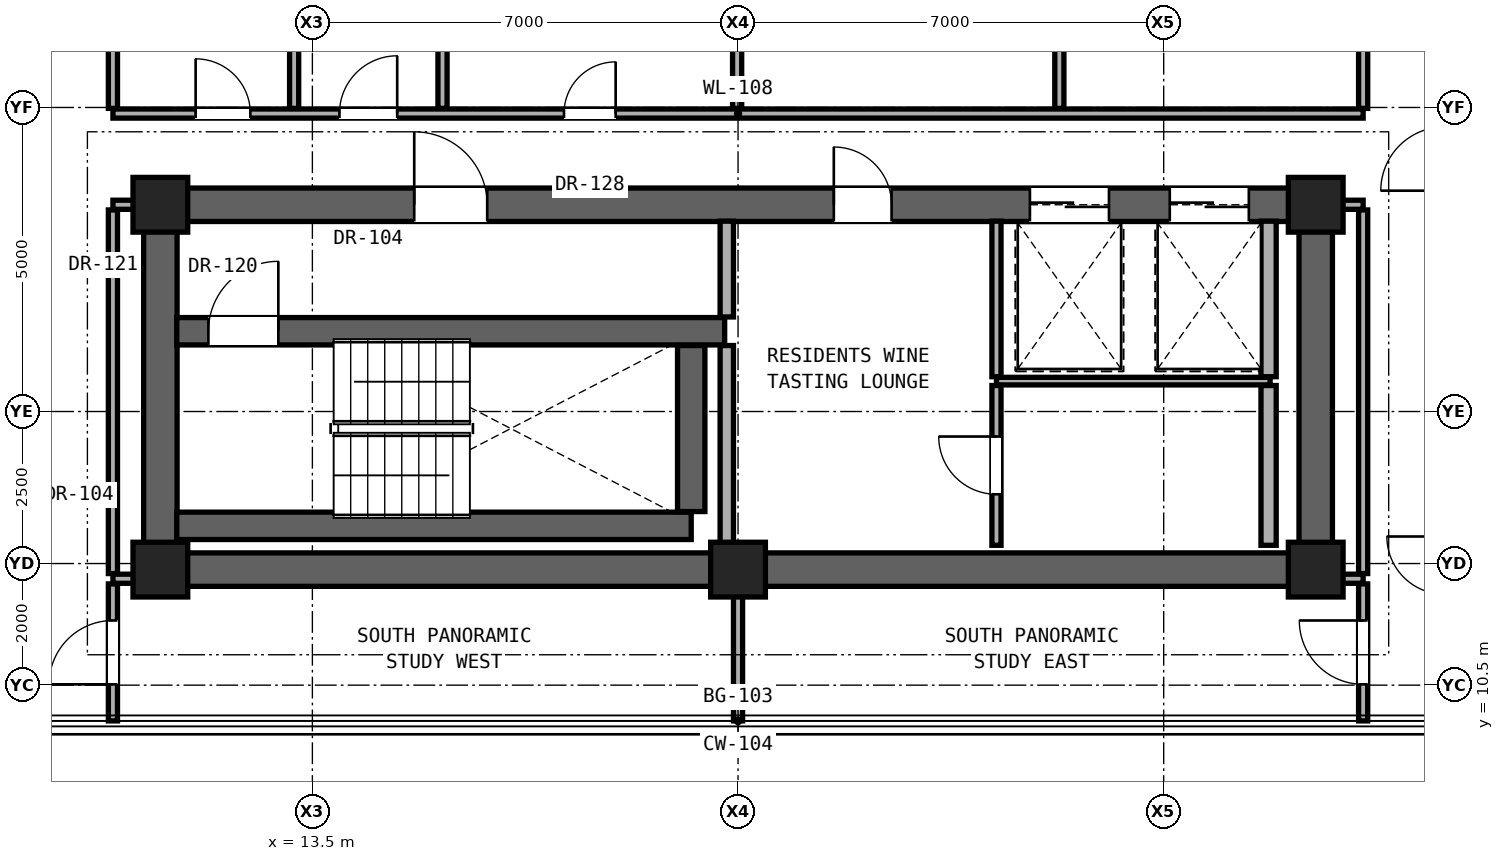
"""IFC4 building model, lengths in metres.
Left out: names, types, materials, properties, quantities, classifications, styles, units other than length and angle.
Written with IfcOpenShell. Run it as: python <this file> out.ifc"""

import sys

from ifc_helpers import new_model, si_unit, direction, frame, frame_2d, origin, origin_2d, place, context, subcontext, project, spatial, rectangle, extrude, element, fill, save


model = new_model("IFC4")
c1 = context("Model", 3, precision=1e-05, world=origin(), true_north=direction((0.0, 1.0)))
c2 = subcontext(c1, "Body", "Model", "MODEL_VIEW")
j1 = project(units=[si_unit("LENGTHUNIT", "METRE"), si_unit("PLANEANGLEUNIT", "RADIAN")], contexts=[c1])
p1 = place(None, origin())
s1 = spatial("IfcSite", under=j1, at=p1, CompositionType="ELEMENT")
p2 = place(p1, origin())
s2 = spatial("IfcBuilding", under=s1, at=p2, CompositionType="ELEMENT")
p3 = place(p2, frame((0.0, 0.0, 186.9)))
s3 = spatial("IfcBuildingStorey", under=s2, at=p3, CompositionType="ELEMENT", Elevation=186.9)
for number, where, z_axis, x_axis in (
    (1, (11.0, 12.4, 0.0), (0.0, 0.0, 1.0), (1.0, 0.0, 0.0)),
    (2, (20.5, 12.4, 0.0), (0.0, 0.0, 1.0), (1.0, 0.0, 0.0)),
    (3, (30.0, 12.4, 0.0), (0.0, 0.0, 1.0), (1.0, 0.0, 0.0)),
    (4, (11.0, 18.4, 0.0), (0.0, 0.0, 1.0), (1.0, 0.0, 0.0)),
    (5, (30.0, 18.4, 0.0), (0.0, 0.0, 1.0), (1.0, 0.0, 0.0)),
):
    element("IfcColumn", number, at=place(p3, frame(where, z_axis=z_axis, x_axis=x_axis)), inside=s3, PredefinedType="COLUMN", context=c2, shape_type="SweptSolid", body=[
        extrude(rectangle(XDim=0.9, YDim=0.9, at=origin_2d()), origin(), (0.0, 0.0, 1.0), 3.25),
    ])
p4 = place(p3, frame((11.0, 12.4, 0.0), z_axis=(0.0, 0.0, 1.0), x_axis=(1.0, 0.0, 0.0)))
e6 = element("IfcWall", 6, at=p4, inside=s3, PredefinedType="SHEAR", context=c2, shape_type="SweptSolid", body=[
    extrude(rectangle(XDim=19.0, YDim=0.55, at=frame_2d((9.5, 0.0))), origin(), (0.0, 0.0, 1.0), 3.05),
])
for number, where, z_axis, x_axis in (
    (7, (11.0, 12.4, 0.0), (0.0, 0.0, 1.0), (0.0, 1.0, 0.0)),
    (8, (30.0, 12.4, 0.0), (0.0, 0.0, 1.0), (0.0, 1.0, 0.0)),
):
    element("IfcWall", number, at=place(p3, frame(where, z_axis=z_axis, x_axis=x_axis)), inside=s3, PredefinedType="SHEAR", context=c2, shape_type="SweptSolid", body=[
        extrude(rectangle(XDim=6.0, YDim=0.55, at=frame_2d((3.0, 0.0))), origin(), (0.0, 0.0, 1.0), 3.05),
    ])
p5 = place(p3, frame((11.0, 18.4, 0.0), z_axis=(0.0, 0.0, 1.0), x_axis=(1.0, 0.0, 0.0)))
e9 = element("IfcWall", 9, at=p5, inside=s3, PredefinedType="SHEAR", context=c2, shape_type="SweptSolid", body=[
    extrude(rectangle(XDim=19.0, YDim=0.55, at=frame_2d((9.5, 0.0))), origin(), (0.0, 0.0, 1.0), 3.05),
])
p6 = place(p5, frame((4.175, 0.0, 0.0)))
e10 = element("IfcOpeningElement", 10, at=p6, cuts=e9, PredefinedType="OPENING", context=c2, shape_type="SweptSolid", body=[
    extrude(rectangle(XDim=1.2, YDim=2.25, at=frame_2d((0.6, 1.125))), frame((0.0, 0.285, 0.0), z_axis=(0.0, -1.0, 0.0), x_axis=(1.0, 0.0, 0.0)), (0.0, 0.0, 1.0), 0.57),
])
p7 = place(p5, frame((11.075, 0.0, 0.0)))
e11 = element("IfcOpeningElement", 11, at=p7, cuts=e9, PredefinedType="OPENING", context=c2, shape_type="SweptSolid", body=[
    extrude(rectangle(XDim=0.95, YDim=2.15, at=frame_2d((0.475, 1.075))), frame((0.0, 0.285, 0.0), z_axis=(0.0, -1.0, 0.0), x_axis=(1.0, 0.0, 0.0)), (0.0, 0.0, 1.0), 0.57),
])
p8 = place(p5, frame((14.3, 0.0, 0.0)))
e12 = element("IfcOpeningElement", 12, at=p8, cuts=e9, PredefinedType="OPENING", context=c2, shape_type="SweptSolid", body=[
    extrude(rectangle(XDim=1.3, YDim=2.3, at=frame_2d((0.65, 1.15))), frame((0.0, 0.285, 0.0), z_axis=(0.0, -1.0, 0.0), x_axis=(1.0, 0.0, 0.0)), (0.0, 0.0, 1.0), 0.57),
])
p9 = place(p5, frame((16.6, 0.0, 0.0)))
e13 = element("IfcOpeningElement", 13, at=p9, cuts=e9, PredefinedType="OPENING", context=c2, shape_type="SweptSolid", body=[
    extrude(rectangle(XDim=1.3, YDim=2.3, at=frame_2d((0.65, 1.15))), frame((0.0, 0.285, 0.0), z_axis=(0.0, -1.0, 0.0), x_axis=(1.0, 0.0, 0.0)), (0.0, 0.0, 1.0), 0.57),
])
for number, where, z_axis, x_axis in (
    (14, (10.22, 12.25, 0.0), (0.0, 0.0, 1.0), (1.0, 0.0, 0.0)),
    (15, (30.27, 12.25, 0.0), (0.0, 0.0, 1.0), (1.0, 0.0, 0.0)),
):
    element("IfcWall", number, at=place(p3, frame(where, z_axis=z_axis, x_axis=x_axis)), inside=s3, PredefinedType="PARTITIONING", context=c2, shape_type="SweptSolid", body=[
        extrude(rectangle(XDim=0.51, YDim=0.15, at=frame_2d((0.255, 0.0))), origin(), (0.0, 0.0, 1.0), 3.05),
    ])
p10 = place(p3, frame((11.27, 13.12, 0.0), z_axis=(0.0, 0.0, 1.0), x_axis=(1.0, 0.0, 0.0)))
e16 = element("IfcWall", 16, at=p10, inside=s3, PredefinedType="SHEAR", context=c2, shape_type="SweptSolid", body=[
    extrude(rectangle(XDim=8.46, YDim=0.45, at=frame_2d((4.23, 0.0))), origin(), (0.0, 0.0, 1.0), 3.05),
])
p11 = place(p3, frame((24.75, 15.5, 0.0), z_axis=(0.0, 0.0, 1.0), x_axis=(1.0, 0.0, 0.0)))
e17 = element("IfcWall", 17, at=p11, inside=s3, PredefinedType="PARTITIONING", context=c2, shape_type="SweptSolid", body=[
    extrude(rectangle(XDim=4.5, YDim=0.125, at=frame_2d((2.25, 0.0))), origin(), (0.0, 0.0, 1.0), 3.05),
])
p12 = place(p3, frame((11.27, 16.32, 0.0), z_axis=(0.0, 0.0, 1.0), x_axis=(1.0, 0.0, 0.0)))
e18 = element("IfcWall", 18, at=p12, inside=s3, PredefinedType="SHEAR", context=c2, shape_type="SweptSolid", body=[
    extrude(rectangle(XDim=9.01, YDim=0.45, at=frame_2d((4.505, 0.0))), origin(), (0.0, 0.0, 1.0), 3.05),
])
p13 = place(p12, frame((0.52, 0.0, 0.0)))
e19 = element("IfcOpeningElement", 19, at=p13, cuts=e18, PredefinedType="OPENING", context=c2, shape_type="SweptSolid", body=[
    extrude(rectangle(XDim=1.15, YDim=2.2, at=frame_2d((0.575, 1.1))), frame((0.0, 0.235, 0.0), z_axis=(0.0, -1.0, 0.0), x_axis=(1.0, 0.0, 0.0)), (0.0, 0.0, 1.0), 0.47),
])
for number, where, z_axis, x_axis in (
    (20, (10.22, 18.4, 0.0), (0.0, 0.0, 1.0), (1.0, 0.0, 0.0)),
    (21, (30.27, 18.4, 0.0), (0.0, 0.0, 1.0), (1.0, 0.0, 0.0)),
):
    element("IfcWall", number, at=place(p3, frame(where, z_axis=z_axis, x_axis=x_axis)), inside=s3, PredefinedType="PARTITIONING", context=c2, shape_type="SweptSolid", body=[
        extrude(rectangle(XDim=0.51, YDim=0.15, at=frame_2d((0.255, 0.0))), origin(), (0.0, 0.0, 1.0), 2.442),
    ])
p14 = place(p3, frame((10.22, 19.9, 0.0), z_axis=(0.0, 0.0, 1.0), x_axis=(1.0, 0.0, 0.0)))
e22 = element("IfcWall", 22, at=p14, inside=s3, PredefinedType="PARTITIONING", context=c2, shape_type="SweptSolid", body=[
    extrude(rectangle(XDim=20.56, YDim=0.15, at=frame_2d((10.28, 0.0))), origin(), (0.0, 0.0, 1.0), 2.186),
])
p15 = place(p14, frame((1.36, 0.0, 0.0)))
e23 = element("IfcOpeningElement", 23, at=p15, cuts=e22, PredefinedType="OPENING", context=c2, shape_type="SweptSolid", body=[
    extrude(rectangle(XDim=0.9, YDim=2.1, at=frame_2d((0.45, 1.05))), frame((0.0, 0.085, 0.0), z_axis=(0.0, -1.0, 0.0), x_axis=(1.0, 0.0, 0.0)), (0.0, 0.0, 1.0), 0.17),
])
p16 = place(p14, frame((3.725, 0.0, 0.0)))
e24 = element("IfcOpeningElement", 24, at=p16, cuts=e22, PredefinedType="OPENING", context=c2, shape_type="SweptSolid", body=[
    extrude(rectangle(XDim=0.95, YDim=2.15, at=frame_2d((0.475, 1.075))), frame((0.0, 0.085, 0.0), z_axis=(0.0, -1.0, 0.0), x_axis=(1.0, 0.0, 0.0)), (0.0, 0.0, 1.0), 0.17),
])
p17 = place(p14, frame((7.417, 0.0, 0.0)))
e25 = element("IfcOpeningElement", 25, at=p17, cuts=e22, PredefinedType="OPENING", context=c2, shape_type="SweptSolid", body=[
    extrude(rectangle(XDim=0.85, YDim=2.01, at=frame_2d((0.425, 1.005))), frame((0.0, 0.085, 0.0), z_axis=(0.0, -1.0, 0.0), x_axis=(1.0, 0.0, 0.0)), (0.0, 0.0, 1.0), 0.17),
])
p18 = place(p3, frame((10.22, 9.912, 0.0), z_axis=(0.0, 0.0, 1.0), x_axis=(0.0, 1.0, 0.0)))
e26 = element("IfcWall", 26, at=p18, inside=s3, PredefinedType="PARTITIONING", context=c2, shape_type="SweptSolid", body=[
    extrude(rectangle(XDim=2.253, YDim=0.15, at=frame_2d((1.126, 0.0))), origin(), (0.0, 0.0, 1.0), 3.05),
])
p19 = place(p18, frame((0.602, 0.0, 0.0)))
e27 = element("IfcOpeningElement", 27, at=p19, cuts=e26, PredefinedType="OPENING", context=c2, shape_type="SweptSolid", body=[
    extrude(rectangle(XDim=1.05, YDim=2.2, at=frame_2d((0.525, 1.1))), frame((0.0, 0.085, 0.0), z_axis=(0.0, -1.0, 0.0), x_axis=(1.0, 0.0, 0.0)), (0.0, 0.0, 1.0), 0.17),
])
p20 = place(p3, frame((10.22, 12.335, 0.0), z_axis=(0.0, 0.0, 1.0), x_axis=(0.0, 1.0, 0.0)))
e28 = element("IfcWall", 28, at=p20, inside=s3, PredefinedType="PARTITIONING", context=c2, shape_type="SweptSolid", body=[
    extrude(rectangle(XDim=5.98, YDim=0.15, at=frame_2d((2.99, 0.0))), origin(), (0.0, 0.0, 1.0), 2.442),
])
for number, where, z_axis, x_axis in (
    (29, (10.22, 19.985, 0.0), (0.0, 0.0, 1.0), (0.0, 1.0, 0.0)),
    (30, (13.2, 19.985, 0.0), (0.0, 0.0, 1.0), (0.0, 1.0, 0.0)),
):
    element("IfcWall", number, at=place(p3, frame(where, z_axis=z_axis, x_axis=x_axis)), inside=s3, PredefinedType="PARTITIONING", context=c2, shape_type="SweptSolid", body=[
        extrude(rectangle(XDim=2.78, YDim=0.15, at=frame_2d((1.39, 0.0))), origin(), (0.0, 0.0, 1.0), 3.05),
    ])
p21 = place(p3, frame((15.64, 19.985, 0.0), z_axis=(0.0, 0.0, 1.0), x_axis=(0.0, 1.0, 0.0)))
e31 = element("IfcWall", 31, at=p21, inside=s3, PredefinedType="PARTITIONING", context=c2, shape_type="SweptSolid", body=[
    extrude(rectangle(XDim=2.78, YDim=0.15, at=frame_2d((1.39, 0.0))), origin(), (0.0, 0.0, 1.0), 2.625),
])
p22 = place(p3, frame((19.73, 13.355, 0.0), z_axis=(0.0, 0.0, 1.0), x_axis=(0.0, 1.0, 0.0)))
e32 = element("IfcWall", 32, at=p22, inside=s3, PredefinedType="SHEAR", context=c2, shape_type="SweptSolid", body=[
    extrude(rectangle(XDim=2.73, YDim=0.45, at=frame_2d((1.365, 0.0))), origin(), (0.0, 0.0, 1.0), 3.05),
])
p23 = place(p3, frame((20.315, 12.8, 0.0), z_axis=(0.0, 0.0, 1.0), x_axis=(0.0, 1.0, 0.0)))
e33 = element("IfcWall", 33, at=p23, inside=s3, PredefinedType="SOLIDWALL", context=c2, shape_type="SweptSolid", body=[
    extrude(rectangle(XDim=3.285, YDim=0.22, at=frame_2d((1.643, 0.0))), origin(), (0.0, 0.0, 1.0), 3.05),
])
p24 = place(p3, frame((20.315, 16.555, 0.0), z_axis=(0.0, 0.0, 1.0), x_axis=(0.0, 1.0, 0.0)))
e34 = element("IfcWall", 34, at=p24, inside=s3, PredefinedType="SOLIDWALL", context=c2, shape_type="SweptSolid", body=[
    extrude(rectangle(XDim=1.575, YDim=0.22, at=frame_2d((0.788, 0.0))), origin(), (0.0, 0.0, 1.0), 3.05),
])
p25 = place(p3, frame((20.5, 9.912, 0.0), z_axis=(0.0, 0.0, 1.0), x_axis=(0.0, 1.0, 0.0)))
e35 = element("IfcWall", 35, at=p25, inside=s3, PredefinedType="PARTITIONING", context=c2, shape_type="SweptSolid", body=[
    extrude(rectangle(XDim=2.218, YDim=0.15, at=frame_2d((1.109, 0.0))), origin(), (0.0, 0.0, 1.0), 3.05),
])
p26 = place(p3, frame((20.485, 19.985, 0.0), z_axis=(0.0, 0.0, 1.0), x_axis=(0.0, 1.0, 0.0)))
e36 = element("IfcWall", 36, at=p26, inside=s3, PredefinedType="PARTITIONING", context=c2, shape_type="SweptSolid", body=[
    extrude(rectangle(XDim=13.03, YDim=0.15, at=frame_2d((6.515, 0.0))), origin(), (0.0, 0.0, 1.0), 2.186),
])
p27 = place(p3, frame((24.75, 12.8, 0.0), z_axis=(0.0, 0.0, 1.0), x_axis=(0.0, 1.0, 0.0)))
e37 = element("IfcWall", 37, at=p27, inside=s3, PredefinedType="PARTITIONING", context=c2, shape_type="SweptSolid", body=[
    extrude(rectangle(XDim=2.627, YDim=0.15, at=frame_2d((1.314, 0.0))), origin(), (0.0, 0.0, 1.0), 3.05),
])
p28 = place(p27, frame((0.839, 0.0, 0.0)))
e38 = element("IfcOpeningElement", 38, at=p28, cuts=e37, PredefinedType="OPENING", context=c2, shape_type="SweptSolid", body=[
    extrude(rectangle(XDim=0.95, YDim=2.15, at=frame_2d((0.475, 1.075))), frame((0.0, 0.085, 0.0), z_axis=(0.0, -1.0, 0.0), x_axis=(1.0, 0.0, 0.0)), (0.0, 0.0, 1.0), 0.17),
])
p29 = place(p3, frame((24.75, 15.573, 0.0), z_axis=(0.0, 0.0, 1.0), x_axis=(0.0, 1.0, 0.0)))
e39 = element("IfcWall", 39, at=p29, inside=s3, PredefinedType="PARTITIONING", context=c2, shape_type="SweptSolid", body=[
    extrude(rectangle(XDim=2.557, YDim=0.15, at=frame_2d((1.279, 0.0))), origin(), (0.0, 0.0, 1.0), 3.05),
])
p30 = place(p3, frame((25.784, 19.985, 0.0), z_axis=(0.0, 0.0, 1.0), x_axis=(0.0, 1.0, 0.0)))
e40 = element("IfcWall", 40, at=p30, inside=s3, PredefinedType="PARTITIONING", context=c2, shape_type="SweptSolid", body=[
    extrude(rectangle(XDim=13.03, YDim=0.15, at=frame_2d((6.515, 0.0))), origin(), (0.0, 0.0, 1.0), 2.186),
])
p31 = place(p3, frame((29.225, 12.8, 0.0), z_axis=(0.0, 0.0, 1.0), x_axis=(0.0, 1.0, 0.0)))
e41 = element("IfcWall", 41, at=p31, inside=s3, PredefinedType="SOLIDWALL", context=c2, shape_type="SweptSolid", body=[
    extrude(rectangle(XDim=2.627, YDim=0.25, at=frame_2d((1.314, 0.0))), origin(), (0.0, 0.0, 1.0), 3.05),
])
p32 = place(p3, frame((29.225, 15.573, 0.0), z_axis=(0.0, 0.0, 1.0), x_axis=(0.0, 1.0, 0.0)))
e42 = element("IfcWall", 42, at=p32, inside=s3, PredefinedType="SOLIDWALL", context=c2, shape_type="SweptSolid", body=[
    extrude(rectangle(XDim=2.557, YDim=0.25, at=frame_2d((1.279, 0.0))), origin(), (0.0, 0.0, 1.0), 3.05),
])
p33 = place(p3, frame((30.78, 9.912, 0.0), z_axis=(0.0, 0.0, 1.0), x_axis=(0.0, 1.0, 0.0)))
e43 = element("IfcWall", 43, at=p33, inside=s3, PredefinedType="PARTITIONING", context=c2, shape_type="SweptSolid", body=[
    extrude(rectangle(XDim=2.253, YDim=0.15, at=frame_2d((1.126, 0.0))), origin(), (0.0, 0.0, 1.0), 3.05),
])
p34 = place(p33, frame((0.602, 0.0, 0.0)))
e44 = element("IfcOpeningElement", 44, at=p34, cuts=e43, PredefinedType="OPENING", context=c2, shape_type="SweptSolid", body=[
    extrude(rectangle(XDim=1.05, YDim=2.2, at=frame_2d((0.525, 1.1))), frame((0.0, 0.085, 0.0), z_axis=(0.0, -1.0, 0.0), x_axis=(1.0, 0.0, 0.0)), (0.0, 0.0, 1.0), 0.17),
])
p35 = place(p3, frame((30.78, 12.335, 0.0), z_axis=(0.0, 0.0, 1.0), x_axis=(0.0, 1.0, 0.0)))
e45 = element("IfcWall", 45, at=p35, inside=s3, PredefinedType="PARTITIONING", context=c2, shape_type="SweptSolid", body=[
    extrude(rectangle(XDim=5.98, YDim=0.15, at=frame_2d((2.99, 0.0))), origin(), (0.0, 0.0, 1.0), 2.442),
])
p36 = place(p3, frame((30.78, 19.985, 0.0), z_axis=(0.0, 0.0, 1.0), x_axis=(0.0, 1.0, 0.0)))
e46 = element("IfcWall", 46, at=p36, inside=s3, PredefinedType="PARTITIONING", context=c2, shape_type="SweptSolid", body=[
    extrude(rectangle(XDim=13.03, YDim=0.15, at=frame_2d((6.515, 0.0))), origin(), (0.0, 0.0, 1.0), 2.346),
])
p37 = place(p6, origin())
e47 = element("IfcDoor", 47, at=p37, inside=s3, OperationType="SINGLE_SWING_LEFT", PredefinedType="DOOR", context=c2, shape_type="SweptSolid", body=[
    extrude(rectangle(XDim=1.2, YDim=2.25, at=frame_2d((0.6, 1.125))), frame((0.0, 0.025, 0.0), z_axis=(0.0, -1.0, 0.0), x_axis=(1.0, 0.0, 0.0)), (0.0, 0.0, 1.0), 0.05),
])
fill(e10, e47)
p38 = place(p13, origin())
e48 = element("IfcDoor", 48, at=p38, inside=s3, OperationType="SINGLE_SWING_RIGHT", PredefinedType="DOOR", context=c2, shape_type="SweptSolid", body=[
    extrude(rectangle(XDim=1.15, YDim=2.2, at=frame_2d((0.575, 1.1))), frame((0.0, 0.025, 0.0), z_axis=(0.0, -1.0, 0.0), x_axis=(1.0, 0.0, 0.0)), (0.0, 0.0, 1.0), 0.05),
])
fill(e19, e48)
p39 = place(p7, origin())
e49 = element("IfcDoor", 49, at=p39, inside=s3, OperationType="SINGLE_SWING_LEFT", PredefinedType="DOOR", context=c2, shape_type="SweptSolid", body=[
    extrude(rectangle(XDim=0.95, YDim=2.15, at=frame_2d((0.475, 1.075))), frame((0.0, 0.025, 0.0), z_axis=(0.0, -1.0, 0.0), x_axis=(1.0, 0.0, 0.0)), (0.0, 0.0, 1.0), 0.05),
])
fill(e11, e49)
p40 = place(p28, origin())
e50 = element("IfcDoor", 50, at=p40, inside=s3, OperationType="SINGLE_SWING_RIGHT", PredefinedType="DOOR", context=c2, shape_type="SweptSolid", body=[
    extrude(rectangle(XDim=0.95, YDim=2.15, at=frame_2d((0.475, 1.075))), frame((0.0, 0.025, 0.0), z_axis=(0.0, -1.0, 0.0), x_axis=(1.0, 0.0, 0.0)), (0.0, 0.0, 1.0), 0.05),
])
fill(e38, e50)
p41 = place(p15, origin())
e51 = element("IfcDoor", 51, at=p41, inside=s3, OperationType="SINGLE_SWING_LEFT", PredefinedType="DOOR", context=c2, shape_type="SweptSolid", body=[
    extrude(rectangle(XDim=0.9, YDim=2.1, at=frame_2d((0.45, 1.05))), frame((0.0, 0.025, 0.0), z_axis=(0.0, -1.0, 0.0), x_axis=(1.0, 0.0, 0.0)), (0.0, 0.0, 1.0), 0.05),
])
fill(e23, e51)
p42 = place(p16, origin())
e52 = element("IfcDoor", 52, at=p42, inside=s3, OperationType="SINGLE_SWING_RIGHT", PredefinedType="DOOR", context=c2, shape_type="SweptSolid", body=[
    extrude(rectangle(XDim=0.95, YDim=2.15, at=frame_2d((0.475, 1.075))), frame((0.0, 0.025, 0.0), z_axis=(0.0, -1.0, 0.0), x_axis=(1.0, 0.0, 0.0)), (0.0, 0.0, 1.0), 0.05),
])
fill(e24, e52)
p43 = place(p17, origin())
e53 = element("IfcDoor", 53, at=p43, inside=s3, OperationType="SINGLE_SWING_RIGHT", PredefinedType="DOOR", context=c2, shape_type="SweptSolid", body=[
    extrude(rectangle(XDim=0.85, YDim=2.01, at=frame_2d((0.425, 1.005))), frame((0.0, 0.025, 0.0), z_axis=(0.0, -1.0, 0.0), x_axis=(1.0, 0.0, 0.0)), (0.0, 0.0, 1.0), 0.05),
])
fill(e25, e53)
p44 = place(p19, origin())
e54 = element("IfcDoor", 54, at=p44, inside=s3, OperationType="SINGLE_SWING_LEFT", PredefinedType="DOOR", context=c2, shape_type="SweptSolid", body=[
    extrude(rectangle(XDim=1.05, YDim=2.2, at=frame_2d((0.525, 1.1))), frame((0.0, 0.025, 0.0), z_axis=(0.0, -1.0, 0.0), x_axis=(1.0, 0.0, 0.0)), (0.0, 0.0, 1.0), 0.05),
])
fill(e27, e54)
p45 = place(p34, origin())
e55 = element("IfcDoor", 55, at=p45, inside=s3, OperationType="SINGLE_SWING_RIGHT", PredefinedType="DOOR", context=c2, shape_type="SweptSolid", body=[
    extrude(rectangle(XDim=1.05, YDim=2.2, at=frame_2d((0.525, 1.1))), frame((0.0, 0.025, 0.0), z_axis=(0.0, -1.0, 0.0), x_axis=(1.0, 0.0, 0.0)), (0.0, 0.0, 1.0), 0.05),
])
fill(e44, e55)
p46 = place(p8, origin())
e56 = element("IfcDoor", 56, at=p46, inside=s3, OperationType="DOUBLE_DOOR_SLIDING", PredefinedType="DOOR", context=c2, shape_type="SweptSolid", body=[
    extrude(rectangle(XDim=1.3, YDim=2.3, at=frame_2d((0.65, 1.15))), frame((0.0, 0.025, 0.0), z_axis=(0.0, -1.0, 0.0), x_axis=(1.0, 0.0, 0.0)), (0.0, 0.0, 1.0), 0.05),
])
fill(e12, e56)
p47 = place(p9, origin())
e57 = element("IfcDoor", 57, at=p47, inside=s3, OperationType="DOUBLE_DOOR_SLIDING", PredefinedType="DOOR", context=c2, shape_type="SweptSolid", body=[
    extrude(rectangle(XDim=1.3, YDim=2.3, at=frame_2d((0.65, 1.15))), frame((0.0, 0.025, 0.0), z_axis=(0.0, -1.0, 0.0), x_axis=(1.0, 0.0, 0.0)), (0.0, 0.0, 1.0), 0.05),
])
fill(e13, e57)
save(model, sys.argv[1])
